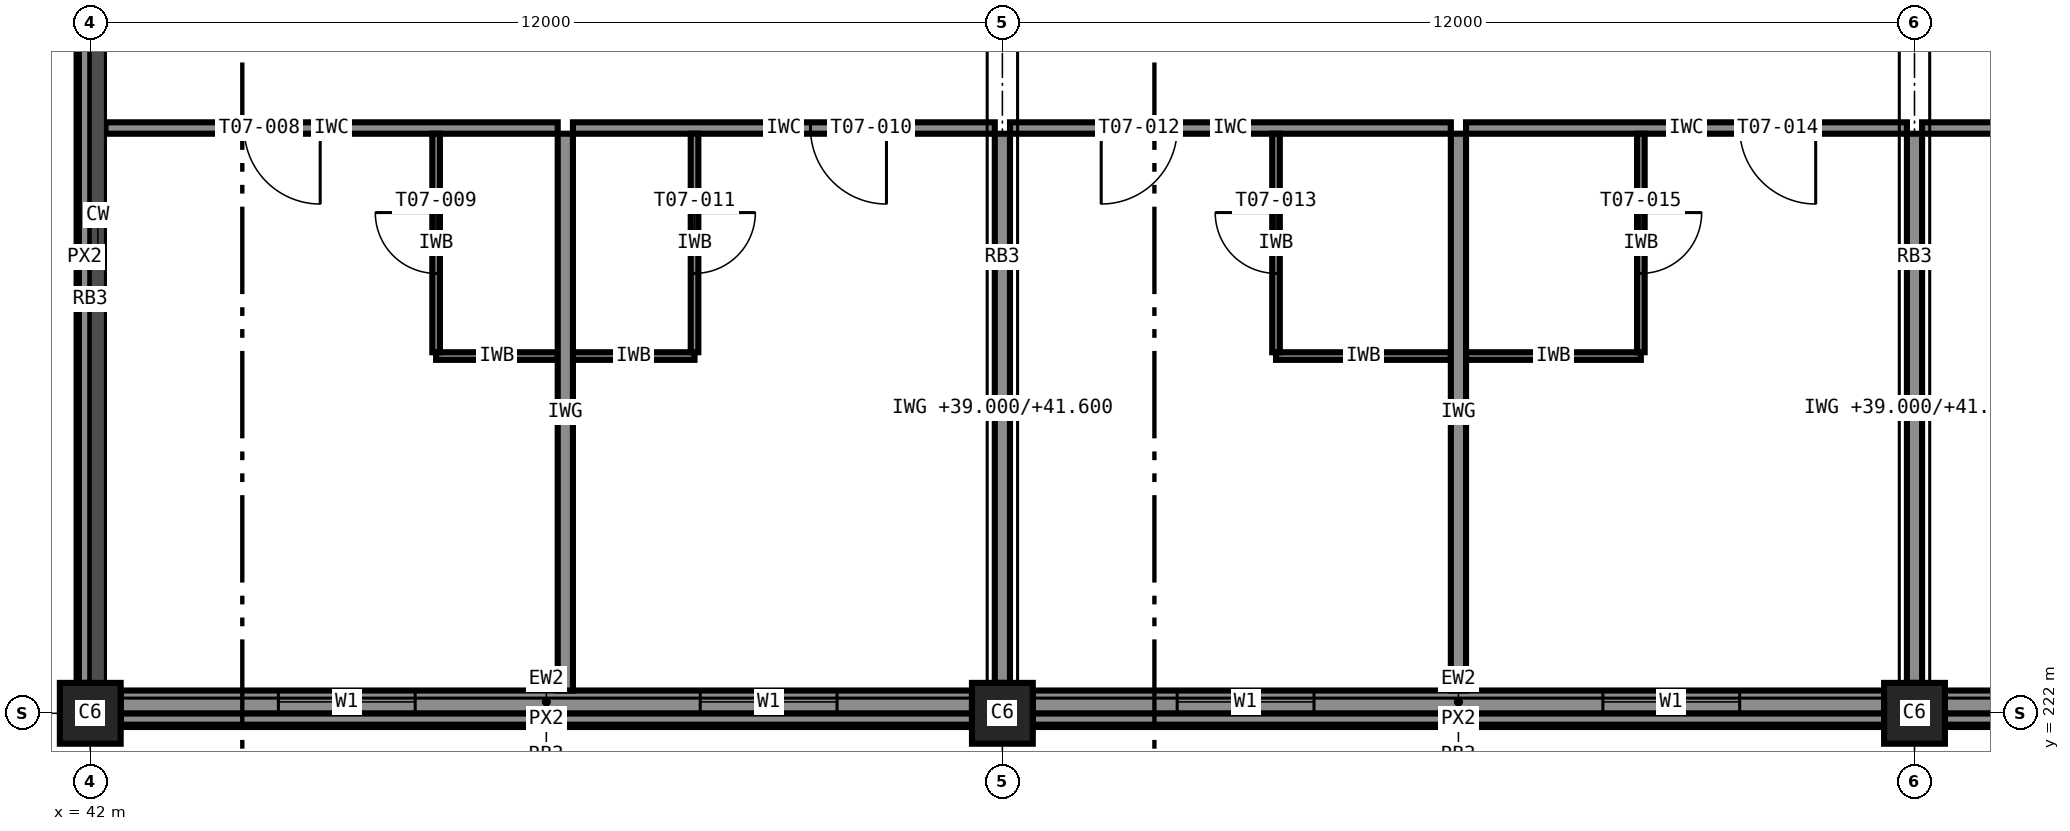
"""IFC4 building model, lengths in metres.
Left out: names, types, materials, properties, quantities, classifications, styles, units other than length and angle.
Written with IfcOpenShell. Run it as: python <this file> out.ifc"""

import sys

from ifc_helpers import new_model, si_unit, direction, frame, frame_2d, origin, origin_2d, place, context, subcontext, project, spatial, rectangle, extrude, element, fill, save


model = new_model("IFC4")
c1 = context("Model", 3, precision=1e-05, world=origin(), true_north=direction((0.0, 1.0)))
c2 = subcontext(c1, "Body", "Model", "MODEL_VIEW")
j1 = project(units=[si_unit("LENGTHUNIT", "METRE"), si_unit("PLANEANGLEUNIT", "RADIAN")], contexts=[c1])
p1 = place(None, origin())
s1 = spatial("IfcSite", under=j1, at=p1, CompositionType="ELEMENT")
p2 = place(p1, origin())
s2 = spatial("IfcBuilding", under=s1, at=p2, CompositionType="ELEMENT")
p3 = place(p2, frame((0.0, 0.0, 39.0)))
s3 = spatial("IfcBuildingStorey", under=s2, at=p3, CompositionType="ELEMENT", Elevation=39.0)
for number, where, z_axis, x_axis in (
    (1, (42.0, 222.0, 0.0), (0.0, 0.0, 1.0), (1.0, 0.0, 0.0)),
    (2, (54.0, 222.0, 0.0), (0.0, 0.0, 1.0), (1.0, 0.0, 0.0)),
    (3, (66.0, 222.0, 0.0), (0.0, 0.0, 1.0), (1.0, 0.0, 0.0)),
):
    element("IfcColumn", number, at=place(p3, frame(where, z_axis=z_axis, x_axis=x_axis)), inside=s3, PredefinedType="COLUMN", context=c2, shape_type="SweptSolid", body=[
        extrude(rectangle(XDim=0.8, YDim=0.8, at=origin_2d()), origin(), (0.0, 0.0, 1.0), 3.6),
    ])
p4 = place(p3, frame((42.4, 222.15, 0.0), z_axis=(0.0, 0.0, 1.0), x_axis=(1.0, 0.0, 0.0)))
e4 = element("IfcWall", 4, at=p4, inside=s3, PredefinedType="STANDARD", context=c2, shape_type="SweptSolid", body=[
    extrude(rectangle(XDim=11.2, YDim=0.3, at=frame_2d((5.6, 0.0))), origin(), (0.0, 0.0, 1.0), 2.6),
])
p5 = place(p4, frame((2.075, 0.0, 0.85)))
e5 = element("IfcOpeningElement", 5, at=p5, cuts=e4, PredefinedType="OPENING", context=c2, shape_type="SweptSolid", body=[
    extrude(rectangle(XDim=1.8, YDim=1.75, at=frame_2d((0.9, 0.875))), frame((0.0, 0.16, 0.0), z_axis=(0.0, -1.0, 0.0), x_axis=(1.0, 0.0, 0.0)), (0.0, 0.0, 1.0), 0.32),
])
p6 = place(p4, frame((7.625, 0.0, 0.85)))
e6 = element("IfcOpeningElement", 6, at=p6, cuts=e4, PredefinedType="OPENING", context=c2, shape_type="SweptSolid", body=[
    extrude(rectangle(XDim=1.8, YDim=1.75, at=frame_2d((0.9, 0.875))), frame((0.0, 0.16, 0.0), z_axis=(0.0, -1.0, 0.0), x_axis=(1.0, 0.0, 0.0)), (0.0, 0.0, 1.0), 0.32),
])
p7 = place(p3, frame((54.4, 222.15, 0.0), z_axis=(0.0, 0.0, 1.0), x_axis=(1.0, 0.0, 0.0)))
e7 = element("IfcWall", 7, at=p7, inside=s3, PredefinedType="STANDARD", context=c2, shape_type="SweptSolid", body=[
    extrude(rectangle(XDim=11.2, YDim=0.3, at=frame_2d((5.6, 0.0))), origin(), (0.0, 0.0, 1.0), 2.6),
])
p8 = place(p7, frame((1.9, 0.0, 0.85)))
e8 = element("IfcOpeningElement", 8, at=p8, cuts=e7, PredefinedType="OPENING", context=c2, shape_type="SweptSolid", body=[
    extrude(rectangle(XDim=1.8, YDim=1.75, at=frame_2d((0.9, 0.875))), frame((0.0, 0.16, 0.0), z_axis=(0.0, -1.0, 0.0), x_axis=(1.0, 0.0, 0.0)), (0.0, 0.0, 1.0), 0.32),
])
p9 = place(p7, frame((7.5, 0.0, 0.85)))
e9 = element("IfcOpeningElement", 9, at=p9, cuts=e7, PredefinedType="OPENING", context=c2, shape_type="SweptSolid", body=[
    extrude(rectangle(XDim=1.8, YDim=1.75, at=frame_2d((0.9, 0.875))), frame((0.0, 0.16, 0.0), z_axis=(0.0, -1.0, 0.0), x_axis=(1.0, 0.0, 0.0)), (0.0, 0.0, 1.0), 0.32),
])
p10 = place(p3, frame((66.4, 222.15, 0.0), z_axis=(0.0, 0.0, 1.0), x_axis=(1.0, 0.0, 0.0)))
e10 = element("IfcWall", 10, at=p10, inside=s3, PredefinedType="STANDARD", context=c2, shape_type="SweptSolid", body=[
    extrude(rectangle(XDim=11.2, YDim=0.3, at=frame_2d((5.6, 0.0))), origin(), (0.0, 0.0, 1.0), 2.6),
])
p11 = place(p10, frame((0.967, 0.0, 0.85)))
e11 = element("IfcOpeningElement", 11, at=p11, cuts=e10, PredefinedType="OPENING", context=c2, shape_type="SweptSolid", body=[
    extrude(rectangle(XDim=1.8, YDim=1.75, at=frame_2d((0.9, 0.875))), frame((0.0, 0.16, 0.0), z_axis=(0.0, -1.0, 0.0), x_axis=(1.0, 0.0, 0.0)), (0.0, 0.0, 1.0), 0.32),
])
p12 = place(p10, frame((4.7, 0.0, 0.85)))
e12 = element("IfcOpeningElement", 12, at=p12, cuts=e10, PredefinedType="OPENING", context=c2, shape_type="SweptSolid", body=[
    extrude(rectangle(XDim=1.8, YDim=1.75, at=frame_2d((0.9, 0.875))), frame((0.0, 0.16, 0.0), z_axis=(0.0, -1.0, 0.0), x_axis=(1.0, 0.0, 0.0)), (0.0, 0.0, 1.0), 0.32),
])
p13 = place(p10, frame((8.433, 0.0, 0.85)))
e13 = element("IfcOpeningElement", 13, at=p13, cuts=e10, PredefinedType="OPENING", context=c2, shape_type="SweptSolid", body=[
    extrude(rectangle(XDim=1.8, YDim=1.75, at=frame_2d((0.9, 0.875))), frame((0.0, 0.16, 0.0), z_axis=(0.0, -1.0, 0.0), x_axis=(1.0, 0.0, 0.0)), (0.0, 0.0, 1.0), 0.32),
])
for number, where, z_axis, x_axis in (
    (14, (42.4, 221.925, 3.4), (0.0, 0.0, 1.0), (1.0, 0.0, 0.0)),
    (15, (54.4, 221.925, 3.4), (0.0, 0.0, 1.0), (1.0, 0.0, 0.0)),
    (16, (66.4, 221.925, 3.4), (0.0, 0.0, 1.0), (1.0, 0.0, 0.0)),
    (17, (41.925, 233.6, 3.4), (0.0, 0.0, 1.0), (0.0, -1.0, 0.0)),
):
    element("IfcWall", number, at=place(p3, frame(where, z_axis=z_axis, x_axis=x_axis)), inside=s3, PredefinedType="STANDARD", context=c2, shape_type="SweptSolid", body=[
        extrude(rectangle(XDim=11.2, YDim=0.15, at=frame_2d((5.6, 0.0))), origin(), (0.0, 0.0, 1.0), 0.2),
    ])
p14 = place(p3, frame((48.15, 229.7, 0.0), z_axis=(0.0, 0.0, 1.0), x_axis=(-1.0, 0.0, 0.0)))
e18 = element("IfcWall", 18, at=p14, inside=s3, PredefinedType="PARTITIONING", context=c2, shape_type="SweptSolid", body=[
    extrude(rectangle(XDim=5.95, YDim=0.15, at=frame_2d((2.975, 0.0))), origin(), (0.0, 0.0, 1.0), 3.4),
])
p15 = place(p14, frame((3.125, 0.0, 0.0)))
e19 = element("IfcOpeningElement", 19, at=p15, cuts=e18, PredefinedType="OPENING", context=c2, shape_type="SweptSolid", body=[
    extrude(rectangle(XDim=1.0, YDim=2.1, at=frame_2d((0.5, 1.05))), frame((0.0, 0.085, 0.0), z_axis=(0.0, -1.0, 0.0), x_axis=(1.0, 0.0, 0.0)), (0.0, 0.0, 1.0), 0.17),
])
p16 = place(p3, frame((46.55, 226.7, 0.0), z_axis=(0.0, 0.0, 1.0), x_axis=(1.0, 0.0, 0.0)))
e20 = element("IfcWall", 20, at=p16, inside=s3, PredefinedType="PARTITIONING", context=c2, shape_type="SweptSolid", body=[
    extrude(rectangle(XDim=1.6, YDim=0.1, at=frame_2d((0.8, 0.0))), origin(), (0.0, 0.0, 1.0), 3.4),
])
p17 = place(p3, frame((46.55, 226.75, 0.0), z_axis=(0.0, 0.0, 1.0), x_axis=(0.0, 1.0, 0.0)))
e21 = element("IfcWall", 21, at=p17, inside=s3, PredefinedType="PARTITIONING", context=c2, shape_type="SweptSolid", body=[
    extrude(rectangle(XDim=2.875, YDim=0.1, at=frame_2d((1.438, 0.0))), origin(), (0.0, 0.0, 1.0), 3.4),
])
p18 = place(p17, frame((1.038, 0.0, 0.0)))
e22 = element("IfcOpeningElement", 22, at=p18, cuts=e21, PredefinedType="OPENING", context=c2, shape_type="SweptSolid", body=[
    extrude(rectangle(XDim=0.8, YDim=2.1, at=frame_2d((0.4, 1.05))), frame((0.0, 0.06, 0.0), z_axis=(0.0, -1.0, 0.0), x_axis=(1.0, 0.0, 0.0)), (0.0, 0.0, 1.0), 0.12),
])
p19 = place(p3, frame((53.9, 229.7, 0.0), z_axis=(0.0, 0.0, 1.0), x_axis=(-1.0, 0.0, 0.0)))
e23 = element("IfcWall", 23, at=p19, inside=s3, PredefinedType="PARTITIONING", context=c2, shape_type="SweptSolid", body=[
    extrude(rectangle(XDim=5.55, YDim=0.15, at=frame_2d((2.775, 0.0))), origin(), (0.0, 0.0, 1.0), 3.4),
])
p20 = place(p19, frame((1.425, 0.0, 0.0)))
e24 = element("IfcOpeningElement", 24, at=p20, cuts=e23, PredefinedType="OPENING", context=c2, shape_type="SweptSolid", body=[
    extrude(rectangle(XDim=1.0, YDim=2.1, at=frame_2d((0.5, 1.05))), frame((0.0, 0.085, 0.0), z_axis=(0.0, -1.0, 0.0), x_axis=(1.0, 0.0, 0.0)), (0.0, 0.0, 1.0), 0.17),
])
p21 = place(p3, frame((48.35, 226.7, 0.0), z_axis=(0.0, 0.0, 1.0), x_axis=(1.0, 0.0, 0.0)))
e25 = element("IfcWall", 25, at=p21, inside=s3, PredefinedType="PARTITIONING", context=c2, shape_type="SweptSolid", body=[
    extrude(rectangle(XDim=1.6, YDim=0.1, at=frame_2d((0.8, 0.0))), origin(), (0.0, 0.0, 1.0), 3.4),
])
p22 = place(p3, frame((49.95, 229.625, 0.0), z_axis=(0.0, 0.0, 1.0), x_axis=(0.0, -1.0, 0.0)))
e26 = element("IfcWall", 26, at=p22, inside=s3, PredefinedType="PARTITIONING", context=c2, shape_type="SweptSolid", body=[
    extrude(rectangle(XDim=2.875, YDim=0.1, at=frame_2d((1.438, 0.0))), origin(), (0.0, 0.0, 1.0), 3.4),
])
p23 = place(p22, frame((1.038, 0.0, 0.0)))
e27 = element("IfcOpeningElement", 27, at=p23, cuts=e26, PredefinedType="OPENING", context=c2, shape_type="SweptSolid", body=[
    extrude(rectangle(XDim=0.8, YDim=2.1, at=frame_2d((0.4, 1.05))), frame((0.0, 0.06, 0.0), z_axis=(0.0, -1.0, 0.0), x_axis=(1.0, 0.0, 0.0)), (0.0, 0.0, 1.0), 0.12),
])
p24 = place(p3, frame((59.9, 229.7, 0.0), z_axis=(0.0, 0.0, 1.0), x_axis=(-1.0, 0.0, 0.0)))
e28 = element("IfcWall", 28, at=p24, inside=s3, PredefinedType="PARTITIONING", context=c2, shape_type="SweptSolid", body=[
    extrude(rectangle(XDim=5.8, YDim=0.15, at=frame_2d((2.9, 0.0))), origin(), (0.0, 0.0, 1.0), 3.4),
])
p25 = place(p24, frame((3.6, 0.0, 0.0)))
e29 = element("IfcOpeningElement", 29, at=p25, cuts=e28, PredefinedType="OPENING", context=c2, shape_type="SweptSolid", body=[
    extrude(rectangle(XDim=1.0, YDim=2.1, at=frame_2d((0.5, 1.05))), frame((0.0, 0.085, 0.0), z_axis=(0.0, -1.0, 0.0), x_axis=(1.0, 0.0, 0.0)), (0.0, 0.0, 1.0), 0.17),
])
p26 = place(p3, frame((57.6, 226.7, 0.0), z_axis=(0.0, 0.0, 1.0), x_axis=(1.0, 0.0, 0.0)))
e30 = element("IfcWall", 30, at=p26, inside=s3, PredefinedType="PARTITIONING", context=c2, shape_type="SweptSolid", body=[
    extrude(rectangle(XDim=2.3, YDim=0.1, at=frame_2d((1.15, 0.0))), origin(), (0.0, 0.0, 1.0), 3.4),
])
p27 = place(p3, frame((57.6, 226.75, 0.0), z_axis=(0.0, 0.0, 1.0), x_axis=(0.0, 1.0, 0.0)))
e31 = element("IfcWall", 31, at=p27, inside=s3, PredefinedType="PARTITIONING", context=c2, shape_type="SweptSolid", body=[
    extrude(rectangle(XDim=2.875, YDim=0.1, at=frame_2d((1.438, 0.0))), origin(), (0.0, 0.0, 1.0), 3.4),
])
p28 = place(p27, frame((1.038, 0.0, 0.0)))
e32 = element("IfcOpeningElement", 32, at=p28, cuts=e31, PredefinedType="OPENING", context=c2, shape_type="SweptSolid", body=[
    extrude(rectangle(XDim=0.8, YDim=2.1, at=frame_2d((0.4, 1.05))), frame((0.0, 0.06, 0.0), z_axis=(0.0, -1.0, 0.0), x_axis=(1.0, 0.0, 0.0)), (0.0, 0.0, 1.0), 0.12),
])
p29 = place(p3, frame((65.9, 229.7, 0.0), z_axis=(0.0, 0.0, 1.0), x_axis=(-1.0, 0.0, 0.0)))
e33 = element("IfcWall", 33, at=p29, inside=s3, PredefinedType="PARTITIONING", context=c2, shape_type="SweptSolid", body=[
    extrude(rectangle(XDim=5.8, YDim=0.15, at=frame_2d((2.9, 0.0))), origin(), (0.0, 0.0, 1.0), 3.4),
])
p30 = place(p29, frame((1.2, 0.0, 0.0)))
e34 = element("IfcOpeningElement", 34, at=p30, cuts=e33, PredefinedType="OPENING", context=c2, shape_type="SweptSolid", body=[
    extrude(rectangle(XDim=1.0, YDim=2.1, at=frame_2d((0.5, 1.05))), frame((0.0, 0.085, 0.0), z_axis=(0.0, -1.0, 0.0), x_axis=(1.0, 0.0, 0.0)), (0.0, 0.0, 1.0), 0.17),
])
p31 = place(p3, frame((60.1, 226.7, 0.0), z_axis=(0.0, 0.0, 1.0), x_axis=(1.0, 0.0, 0.0)))
e35 = element("IfcWall", 35, at=p31, inside=s3, PredefinedType="PARTITIONING", context=c2, shape_type="SweptSolid", body=[
    extrude(rectangle(XDim=2.3, YDim=0.1, at=frame_2d((1.15, 0.0))), origin(), (0.0, 0.0, 1.0), 3.4),
])
p32 = place(p3, frame((62.4, 229.625, 0.0), z_axis=(0.0, 0.0, 1.0), x_axis=(0.0, -1.0, 0.0)))
e36 = element("IfcWall", 36, at=p32, inside=s3, PredefinedType="PARTITIONING", context=c2, shape_type="SweptSolid", body=[
    extrude(rectangle(XDim=2.875, YDim=0.1, at=frame_2d((1.438, 0.0))), origin(), (0.0, 0.0, 1.0), 3.4),
])
p33 = place(p32, frame((1.038, 0.0, 0.0)))
e37 = element("IfcOpeningElement", 37, at=p33, cuts=e36, PredefinedType="OPENING", context=c2, shape_type="SweptSolid", body=[
    extrude(rectangle(XDim=0.8, YDim=2.1, at=frame_2d((0.4, 1.05))), frame((0.0, 0.06, 0.0), z_axis=(0.0, -1.0, 0.0), x_axis=(1.0, 0.0, 0.0)), (0.0, 0.0, 1.0), 0.12),
])
p34 = place(p3, frame((77.9, 229.7, 0.0), z_axis=(0.0, 0.0, 1.0), x_axis=(-1.0, 0.0, 0.0)))
e38 = element("IfcWall", 38, at=p34, inside=s3, PredefinedType="PARTITIONING", context=c2, shape_type="SweptSolid", body=[
    extrude(rectangle(XDim=11.8, YDim=0.15, at=frame_2d((5.9, 0.0))), origin(), (0.0, 0.0, 1.0), 3.4),
])
p35 = place(p34, frame((5.0, 0.0, 0.0)))
e39 = element("IfcOpeningElement", 39, at=p35, cuts=e38, PredefinedType="OPENING", context=c2, shape_type="SweptSolid", body=[
    extrude(rectangle(XDim=1.8, YDim=2.1, at=frame_2d((0.9, 1.05))), frame((0.0, 0.085, 0.0), z_axis=(0.0, -1.0, 0.0), x_axis=(1.0, 0.0, 0.0)), (0.0, 0.0, 1.0), 0.17),
])
p36 = place(p3, frame((48.25, 222.3, 0.0), z_axis=(0.0, 0.0, 1.0), x_axis=(0.0, 1.0, 0.0)))
e40 = element("IfcWall", 40, at=p36, inside=s3, PredefinedType="PARTITIONING", context=c2, shape_type="SweptSolid", body=[
    extrude(rectangle(XDim=7.325, YDim=0.2, at=frame_2d((3.663, 0.0))), origin(), (0.0, 0.0, 1.0), 3.4),
])
p37 = place(p3, frame((54.0, 222.4, 0.0), z_axis=(0.0, 0.0, 1.0), x_axis=(0.0, 1.0, 0.0)))
e41 = element("IfcWall", 41, at=p37, inside=s3, PredefinedType="PARTITIONING", context=c2, shape_type="SweptSolid", body=[
    extrude(rectangle(XDim=7.225, YDim=0.2, at=frame_2d((3.613, 0.0))), origin(), (0.0, 0.0, 1.0), 2.6),
])
p38 = place(p3, frame((60.0, 222.3, 0.0), z_axis=(0.0, 0.0, 1.0), x_axis=(0.0, 1.0, 0.0)))
e42 = element("IfcWall", 42, at=p38, inside=s3, PredefinedType="PARTITIONING", context=c2, shape_type="SweptSolid", body=[
    extrude(rectangle(XDim=7.325, YDim=0.2, at=frame_2d((3.663, 0.0))), origin(), (0.0, 0.0, 1.0), 3.4),
])
p39 = place(p3, frame((66.0, 222.4, 0.0), z_axis=(0.0, 0.0, 1.0), x_axis=(0.0, 1.0, 0.0)))
e43 = element("IfcWall", 43, at=p39, inside=s3, PredefinedType="PARTITIONING", context=c2, shape_type="SweptSolid", body=[
    extrude(rectangle(XDim=7.225, YDim=0.2, at=frame_2d((3.613, 0.0))), origin(), (0.0, 0.0, 1.0), 2.6),
])
p40 = place(p5, origin())
e44 = element("IfcWindow", 44, at=p40, inside=s3, PartitioningType="SINGLE_PANEL", PredefinedType="WINDOW", context=c2, shape_type="SweptSolid", body=[
    extrude(rectangle(XDim=1.8, YDim=1.75, at=frame_2d((0.9, 0.875))), frame((0.0, 0.03, 0.0), z_axis=(0.0, -1.0, 0.0), x_axis=(1.0, 0.0, 0.0)), (0.0, 0.0, 1.0), 0.06),
])
fill(e5, e44)
p41 = place(p6, origin())
e45 = element("IfcWindow", 45, at=p41, inside=s3, PartitioningType="SINGLE_PANEL", PredefinedType="WINDOW", context=c2, shape_type="SweptSolid", body=[
    extrude(rectangle(XDim=1.8, YDim=1.75, at=frame_2d((0.9, 0.875))), frame((0.0, 0.03, 0.0), z_axis=(0.0, -1.0, 0.0), x_axis=(1.0, 0.0, 0.0)), (0.0, 0.0, 1.0), 0.06),
])
fill(e6, e45)
p42 = place(p8, origin())
e46 = element("IfcWindow", 46, at=p42, inside=s3, PartitioningType="SINGLE_PANEL", PredefinedType="WINDOW", context=c2, shape_type="SweptSolid", body=[
    extrude(rectangle(XDim=1.8, YDim=1.75, at=frame_2d((0.9, 0.875))), frame((0.0, 0.03, 0.0), z_axis=(0.0, -1.0, 0.0), x_axis=(1.0, 0.0, 0.0)), (0.0, 0.0, 1.0), 0.06),
])
fill(e8, e46)
p43 = place(p9, origin())
e47 = element("IfcWindow", 47, at=p43, inside=s3, PartitioningType="SINGLE_PANEL", PredefinedType="WINDOW", context=c2, shape_type="SweptSolid", body=[
    extrude(rectangle(XDim=1.8, YDim=1.75, at=frame_2d((0.9, 0.875))), frame((0.0, 0.03, 0.0), z_axis=(0.0, -1.0, 0.0), x_axis=(1.0, 0.0, 0.0)), (0.0, 0.0, 1.0), 0.06),
])
fill(e9, e47)
p44 = place(p15, origin())
e48 = element("IfcDoor", 48, at=p44, inside=s3, OperationType="SINGLE_SWING_LEFT", PredefinedType="DOOR", context=c2, shape_type="SweptSolid", body=[
    extrude(rectangle(XDim=1.0, YDim=2.1, at=frame_2d((0.5, 1.05))), frame((0.0, 0.025, 0.0), z_axis=(0.0, -1.0, 0.0), x_axis=(1.0, 0.0, 0.0)), (0.0, 0.0, 1.0), 0.05),
])
fill(e19, e48)
p45 = place(p18, origin())
e49 = element("IfcDoor", 49, at=p45, inside=s3, OperationType="SINGLE_SWING_RIGHT", PredefinedType="DOOR", context=c2, shape_type="SweptSolid", body=[
    extrude(rectangle(XDim=0.8, YDim=2.1, at=frame_2d((0.4, 1.05))), frame((0.0, 0.025, 0.0), z_axis=(0.0, -1.0, 0.0), x_axis=(1.0, 0.0, 0.0)), (0.0, 0.0, 1.0), 0.05),
])
fill(e22, e49)
p46 = place(p20, origin())
e50 = element("IfcDoor", 50, at=p46, inside=s3, OperationType="SINGLE_SWING_LEFT", PredefinedType="DOOR", context=c2, shape_type="SweptSolid", body=[
    extrude(rectangle(XDim=1.0, YDim=2.1, at=frame_2d((0.5, 1.05))), frame((0.0, 0.025, 0.0), z_axis=(0.0, -1.0, 0.0), x_axis=(1.0, 0.0, 0.0)), (0.0, 0.0, 1.0), 0.05),
])
fill(e24, e50)
p47 = place(p23, origin())
e51 = element("IfcDoor", 51, at=p47, inside=s3, OperationType="SINGLE_SWING_LEFT", PredefinedType="DOOR", context=c2, shape_type="SweptSolid", body=[
    extrude(rectangle(XDim=0.8, YDim=2.1, at=frame_2d((0.4, 1.05))), frame((0.0, 0.025, 0.0), z_axis=(0.0, -1.0, 0.0), x_axis=(1.0, 0.0, 0.0)), (0.0, 0.0, 1.0), 0.05),
])
fill(e27, e51)
p48 = place(p25, origin())
e52 = element("IfcDoor", 52, at=p48, inside=s3, OperationType="SINGLE_SWING_RIGHT", PredefinedType="DOOR", context=c2, shape_type="SweptSolid", body=[
    extrude(rectangle(XDim=1.0, YDim=2.1, at=frame_2d((0.5, 1.05))), frame((0.0, 0.025, 0.0), z_axis=(0.0, -1.0, 0.0), x_axis=(1.0, 0.0, 0.0)), (0.0, 0.0, 1.0), 0.05),
])
fill(e29, e52)
p49 = place(p28, origin())
e53 = element("IfcDoor", 53, at=p49, inside=s3, OperationType="SINGLE_SWING_RIGHT", PredefinedType="DOOR", context=c2, shape_type="SweptSolid", body=[
    extrude(rectangle(XDim=0.8, YDim=2.1, at=frame_2d((0.4, 1.05))), frame((0.0, 0.025, 0.0), z_axis=(0.0, -1.0, 0.0), x_axis=(1.0, 0.0, 0.0)), (0.0, 0.0, 1.0), 0.05),
])
fill(e32, e53)
p50 = place(p30, origin())
e54 = element("IfcDoor", 54, at=p50, inside=s3, OperationType="SINGLE_SWING_LEFT", PredefinedType="DOOR", context=c2, shape_type="SweptSolid", body=[
    extrude(rectangle(XDim=1.0, YDim=2.1, at=frame_2d((0.5, 1.05))), frame((0.0, 0.025, 0.0), z_axis=(0.0, -1.0, 0.0), x_axis=(1.0, 0.0, 0.0)), (0.0, 0.0, 1.0), 0.05),
])
fill(e34, e54)
p51 = place(p33, origin())
e55 = element("IfcDoor", 55, at=p51, inside=s3, OperationType="SINGLE_SWING_LEFT", PredefinedType="DOOR", context=c2, shape_type="SweptSolid", body=[
    extrude(rectangle(XDim=0.8, YDim=2.1, at=frame_2d((0.4, 1.05))), frame((0.0, 0.025, 0.0), z_axis=(0.0, -1.0, 0.0), x_axis=(1.0, 0.0, 0.0)), (0.0, 0.0, 1.0), 0.05),
])
fill(e37, e55)
save(model, sys.argv[1])
